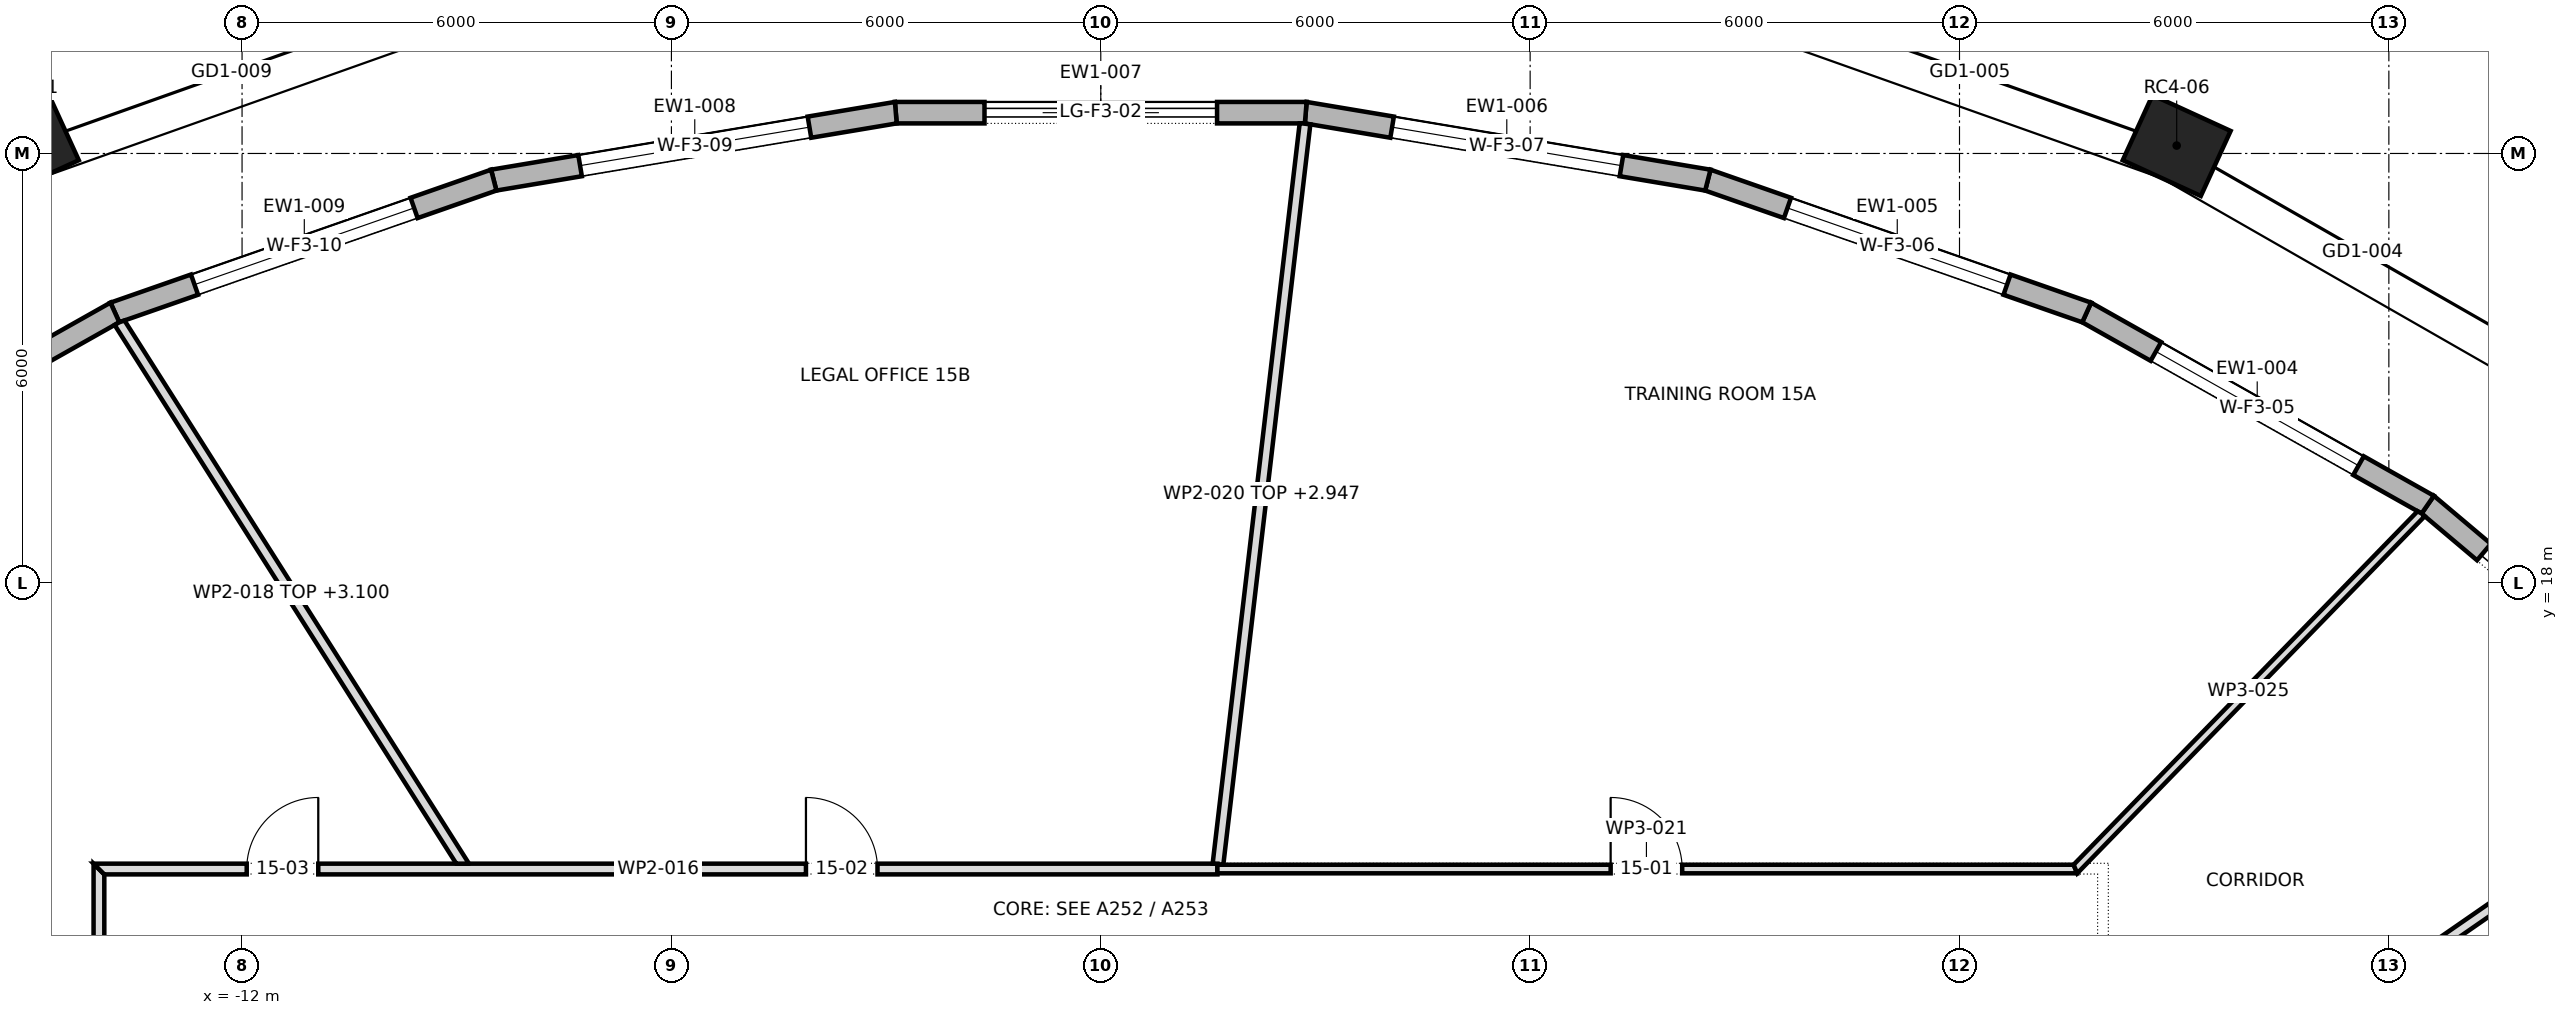
"""IFC4 building model, lengths in metres.
Left out: names, types, materials, properties, quantities, classifications, styles, units other than length and angle.
Written with IfcOpenShell. Run it as: python <this file> out.ifc"""

import sys

from ifc_helpers import new_model, si_unit, direction, frame, frame_2d, origin, origin_2d, place, context, subcontext, project, spatial, polyline, rectangle, outline, extrude, element, fill, save


model = new_model("IFC4")
c1 = context("Model", 3, precision=1e-05, world=origin(), true_north=direction((0.0, 1.0)))
c2 = subcontext(c1, "Body", "Model", "MODEL_VIEW")
j1 = project(units=[si_unit("LENGTHUNIT", "METRE"), si_unit("PLANEANGLEUNIT", "RADIAN")], contexts=[c1])
p1 = place(None, origin())
s1 = spatial("IfcSite", under=j1, at=p1, CompositionType="ELEMENT")
p2 = place(p1, origin())
s2 = spatial("IfcBuilding", under=s1, at=p2, CompositionType="ELEMENT")
p3 = place(p2, frame((0.0, 0.0, 214.9)))
s3 = spatial("IfcBuildingStorey", under=s2, at=p3, CompositionType="ELEMENT", Elevation=214.9)
for number, where, z_axis, x_axis in (
    (1, (15.035, 24.11, 0.0), (0.0, 0.0, 1.0), (-0.909, 0.417, 0.0)),
    (2, (-15.035, 24.11, 0.0), (0.0, 0.0, 1.0), (-0.909, -0.417, 0.0)),
):
    element("IfcColumn", number, at=place(p3, frame(where, z_axis=z_axis, x_axis=x_axis)), inside=s3, PredefinedType="COLUMN", context=c2, shape_type="SweptSolid", body=[
        extrude(rectangle(XDim=1.2, YDim=1.0, at=origin_2d()), origin(), (0.0, 0.0, 1.0), 4.0),
    ])
p4 = place(p3, frame((22.599, 15.672, 0.0), z_axis=(0.0, 0.0, 1.0), x_axis=(-0.764397795062, 0.644744919255, 0.0)))
e3 = element("IfcWall", 3, at=p4, inside=s3, PredefinedType="STANDARD", context=c2, shape_type="SweptSolid", body=[
    extrude(outline(polyline([(-0.015, -0.15), (5.319, -0.15), (5.291, 0.15), (0.015, 0.15), (-0.015, -0.15)])), origin(), (0.0, 0.0, 1.0), 3.7),
])
p5 = place(p4, frame((1.028, 0.0, 0.0)))
e4 = element("IfcOpeningElement", 4, at=p5, cuts=e3, PredefinedType="OPENING", context=c2, shape_type="SweptSolid", body=[
    extrude(rectangle(XDim=3.25, YDim=3.25, at=frame_2d((1.625, 1.625))), frame((0.0, 0.162, 0.0), z_axis=(0.0, -1.0, 0.0), x_axis=(1.0, 0.0, 0.0)), (0.0, 0.0, 1.0), 0.324),
])
p6 = place(p3, frame((18.543, 19.092, 0.0), z_axis=(0.0, 0.0, 1.0), x_axis=(-0.871207038577, 0.490915772749, 0.0)))
e5 = element("IfcWall", 5, at=p6, inside=s3, PredefinedType="STANDARD", context=c2, shape_type="SweptSolid", body=[
    extrude(outline(polyline([(-0.014, -0.15), (5.484, -0.15), (5.458, 0.15), (0.014, 0.15), (-0.014, -0.15)])), origin(), (0.0, 0.0, 1.0), 3.7),
])
p7 = place(p6, frame((1.111, 0.0, 0.6)))
e6 = element("IfcOpeningElement", 6, at=p7, cuts=e5, PredefinedType="OPENING", context=c2, shape_type="SweptSolid", body=[
    extrude(rectangle(XDim=3.25, YDim=2.65, at=frame_2d((1.625, 1.325))), frame((0.0, 0.162, 0.0), z_axis=(0.0, -1.0, 0.0), x_axis=(1.0, 0.0, 0.0)), (0.0, 0.0, 1.0), 0.324),
])
p8 = place(p3, frame((13.777, 21.778, 0.0), z_axis=(0.0, 0.0, 1.0), x_axis=(-0.944053670735, 0.329791853708, 0.0)))
e7 = element("IfcWall", 7, at=p8, inside=s3, PredefinedType="STANDARD", context=c2, shape_type="SweptSolid", body=[
    extrude(outline(polyline([(-0.013, -0.15), (5.62, -0.15), (5.595, 0.15), (0.013, 0.15), (-0.013, -0.15)])), origin(), (0.0, 0.0, 1.0), 3.7),
])
p9 = place(p8, frame((1.179, 0.0, 0.6)))
e8 = element("IfcOpeningElement", 8, at=p9, cuts=e7, PredefinedType="OPENING", context=c2, shape_type="SweptSolid", body=[
    extrude(rectangle(XDim=3.25, YDim=2.65, at=frame_2d((1.625, 1.325))), frame((0.0, 0.162, 0.0), z_axis=(0.0, -1.0, 0.0), x_axis=(1.0, 0.0, 0.0)), (0.0, 0.0, 1.0), 0.324),
])
p10 = place(p3, frame((8.483, 23.627, 0.0), z_axis=(0.0, 0.0, 1.0), x_axis=(-0.986218486863, 0.16544816762, 0.0)))
e9 = element("IfcWall", 9, at=p10, inside=s3, PredefinedType="STANDARD", context=c2, shape_type="SweptSolid", body=[
    extrude(outline(polyline([(-0.013, -0.15), (5.71, -0.15), (5.685, 0.15), (0.013, 0.15), (-0.013, -0.15)])), origin(), (0.0, 0.0, 1.0), 3.7),
])
p11 = place(p10, frame((1.224, 0.0, 0.6)))
e10 = element("IfcOpeningElement", 10, at=p11, cuts=e9, PredefinedType="OPENING", context=c2, shape_type="SweptSolid", body=[
    extrude(rectangle(XDim=3.25, YDim=2.65, at=frame_2d((1.625, 1.325))), frame((0.0, 0.162, 0.0), z_axis=(0.0, -1.0, 0.0), x_axis=(1.0, 0.0, 0.0)), (0.0, 0.0, 1.0), 0.324),
])
p12 = place(p3, frame((2.864, 24.57, 0.0), z_axis=(0.0, 0.0, 1.0), x_axis=(-1.0, 0.0, 0.0)))
e11 = element("IfcWall", 11, at=p12, inside=s3, PredefinedType="STANDARD", context=c2, shape_type="SweptSolid", body=[
    extrude(outline(polyline([(-0.012, -0.15), (5.741, -0.15), (5.716, 0.15), (0.012, 0.15), (-0.012, -0.15)])), origin(), (0.0, 0.0, 1.0), 3.7),
])
p13 = place(p12, frame((1.239, 0.0, 0.0)))
e12 = element("IfcOpeningElement", 12, at=p13, cuts=e11, PredefinedType="OPENING", context=c2, shape_type="SweptSolid", body=[
    extrude(rectangle(XDim=3.25, YDim=3.25, at=frame_2d((1.625, 1.625))), frame((0.0, 0.162, 0.0), z_axis=(0.0, -1.0, 0.0), x_axis=(1.0, 0.0, 0.0)), (0.0, 0.0, 1.0), 0.324),
])
p14 = place(p3, frame((-2.864, 24.57, 0.0), z_axis=(0.0, 0.0, 1.0), x_axis=(-0.986218486863, -0.16544816762, 0.0)))
e13 = element("IfcWall", 13, at=p14, inside=s3, PredefinedType="STANDARD", context=c2, shape_type="SweptSolid", body=[
    extrude(outline(polyline([(-0.012, -0.15), (5.71, -0.15), (5.685, 0.15), (0.012, 0.15), (-0.012, -0.15)])), origin(), (0.0, 0.0, 1.0), 3.7),
])
p15 = place(p14, frame((1.224, 0.0, 0.6)))
e14 = element("IfcOpeningElement", 14, at=p15, cuts=e13, PredefinedType="OPENING", context=c2, shape_type="SweptSolid", body=[
    extrude(rectangle(XDim=3.25, YDim=2.65, at=frame_2d((1.625, 1.325))), frame((0.0, 0.162, 0.0), z_axis=(0.0, -1.0, 0.0), x_axis=(1.0, 0.0, 0.0)), (0.0, 0.0, 1.0), 0.324),
])
p16 = place(p3, frame((-8.483, 23.627, 0.0), z_axis=(0.0, 0.0, 1.0), x_axis=(-0.944053670735, -0.329791853708, 0.0)))
e15 = element("IfcWall", 15, at=p16, inside=s3, PredefinedType="STANDARD", context=c2, shape_type="SweptSolid", body=[
    extrude(outline(polyline([(-0.013, -0.15), (5.621, -0.15), (5.594, 0.15), (0.013, 0.15), (-0.013, -0.15)])), origin(), (0.0, 0.0, 1.0), 3.7),
])
p17 = place(p16, frame((1.179, 0.0, 0.6)))
e16 = element("IfcOpeningElement", 16, at=p17, cuts=e15, PredefinedType="OPENING", context=c2, shape_type="SweptSolid", body=[
    extrude(rectangle(XDim=3.25, YDim=2.65, at=frame_2d((1.625, 1.325))), frame((0.0, 0.162, 0.0), z_axis=(0.0, -1.0, 0.0), x_axis=(1.0, 0.0, 0.0)), (0.0, 0.0, 1.0), 0.324),
])
p18 = place(p3, frame((-13.777, 21.778, 0.0), z_axis=(0.0, 0.0, 1.0), x_axis=(-0.871207038577, -0.490915772749, 0.0)))
e17 = element("IfcWall", 17, at=p18, inside=s3, PredefinedType="STANDARD", context=c2, shape_type="SweptSolid", body=[
    extrude(outline(polyline([(-0.013, -0.15), (5.485, -0.15), (5.457, 0.15), (0.013, 0.15), (-0.013, -0.15)])), origin(), (0.0, 0.0, 1.0), 3.7),
])
p19 = place(p18, frame((1.111, 0.0, 0.6)))
e18 = element("IfcOpeningElement", 18, at=p19, cuts=e17, PredefinedType="OPENING", context=c2, shape_type="SweptSolid", body=[
    extrude(rectangle(XDim=3.25, YDim=2.65, at=frame_2d((1.625, 1.325))), frame((0.0, 0.162, 0.0), z_axis=(0.0, -1.0, 0.0), x_axis=(1.0, 0.0, 0.0)), (0.0, 0.0, 1.0), 0.324),
])
p20 = place(p3, frame((-22.494, 15.57, 0.0), z_axis=(0.0, 0.0, 1.0), x_axis=(0.822227997751, -0.569158255421, 0.0)))
e19 = element("IfcWall", 19, at=p20, inside=s3, PredefinedType="PARTITIONING", context=c2, shape_type="SweptSolid", body=[
    extrude(outline(polyline([(0.0, -0.075), (1.858, -0.075), (3.717, -0.075), (5.575, -0.075), (5.577, -0.073), (5.578, -0.075), (7.155, -0.075), (8.732, -0.075), (10.309, -0.075), (10.309, -0.075), (10.281, -0.034), (10.269, -0.043), (10.24, -0.002), (10.24, -0.002), (10.187, 0.075), (8.493, 0.075), (6.8, 0.075), (5.106, 0.075), (3.412, 0.075), (1.719, 0.075), (0.025, 0.075), (0.004, -0.0), (0.0, -0.066), (0.0, -0.075)])), origin(), (0.0, 0.0, 1.0), 2.947),
])
p21 = place(p3, frame((-14.0, 9.69, 0.0), z_axis=(0.0, 0.0, 1.0), x_axis=(0.0, 1.0, 0.0)))
e20 = element("IfcWall", 20, at=p21, inside=s3, PredefinedType="PARTITIONING", context=c2, shape_type="SweptSolid", body=[
    extrude(outline(polyline([(0.0, -0.075), (1.412, -0.075), (2.823, -0.075), (4.235, -0.075), (4.385, 0.075), (2.923, 0.075), (1.462, 0.075), (0.0, 0.075), (0.0, -0.075)])), origin(), (0.0, 0.0, 1.0), 3.7),
])
p22 = place(p3, frame((-14.075, 14.0, 0.0), z_axis=(0.0, 0.0, 1.0), x_axis=(1.0, 0.0, 0.0)))
e21 = element("IfcWall", 21, at=p22, inside=s3, PredefinedType="PARTITIONING", context=c2, shape_type="SweptSolid", body=[
    extrude(outline(polyline([(15.705, 0.075), (13.742, 0.075), (11.779, 0.075), (9.815, 0.075), (7.853, 0.075), (5.889, 0.075), (3.926, 0.075), (1.963, 0.075), (0.0, 0.075), (0.15, -0.075), (2.094, -0.075), (4.039, -0.075), (5.983, -0.075), (7.927, -0.075), (9.872, -0.075), (11.816, -0.075), (13.76, -0.075), (15.705, -0.075), (15.705, 0.075)])), origin(), (0.0, 0.0, 1.0), 3.7),
])
p23 = place(p22, frame((9.955, 0.0, 0.0)))
e22 = element("IfcOpeningElement", 22, at=p23, cuts=e21, PredefinedType="OPENING", context=c2, shape_type="SweptSolid", body=[
    extrude(rectangle(XDim=1.0, YDim=2.1, at=frame_2d((0.5, 1.05))), frame((0.0, 0.087, 0.0), z_axis=(0.0, -1.0, 0.0), x_axis=(1.0, 0.0, 0.0)), (0.0, 0.0, 1.0), 0.174),
])
p24 = place(p22, frame((2.14, 0.0, 0.0)))
e23 = element("IfcOpeningElement", 23, at=p24, cuts=e21, PredefinedType="OPENING", context=c2, shape_type="SweptSolid", body=[
    extrude(rectangle(XDim=1.0, YDim=2.1, at=frame_2d((0.5, 1.05))), frame((0.0, 0.087, 0.0), z_axis=(0.0, -1.0, 0.0), x_axis=(1.0, 0.0, 0.0)), (0.0, 0.0, 1.0), 0.174),
])
p25 = place(p3, frame((-8.892, 14.035, 0.0), z_axis=(0.0, 0.0, 1.0), x_axis=(-0.535558051622, 0.84449841524, 0.0)))
e24 = element("IfcWall", 24, at=p25, inside=s3, PredefinedType="PARTITIONING", context=c2, shape_type="SweptSolid", body=[
    extrude(outline(polyline([(0.0, -0.075), (1.798, -0.075), (3.595, -0.075), (5.393, -0.075), (7.191, -0.075), (8.989, -0.075), (9.006, -0.0), (9.01, 0.069), (9.01, 0.075), (7.227, 0.075), (5.444, 0.075), (3.661, 0.075), (1.878, 0.075), (0.095, 0.075), (0.0, -0.075), (0.0, -0.075)])), origin(), (0.0, 0.0, 1.0), 3.1),
])
p26 = place(p3, frame((1.638, 14.066, 0.0), z_axis=(0.0, 0.0, 1.0), x_axis=(0.116747450487, 0.993161634783, 0.0)))
e25 = element("IfcWall", 25, at=p26, inside=s3, PredefinedType="PARTITIONING", context=c2, shape_type="SweptSolid", body=[
    extrude(outline(polyline([(10.42, -0.075), (10.42, 0.039), (10.416, 0.075), (8.68, 0.075), (6.944, 0.075), (5.208, 0.075), (3.472, 0.075), (1.736, 0.075), (0.0, 0.075), (0.0, 0.074), (0.008, 0.009), (0.0, 0.008), (0.0, -0.055), (0.002, -0.075), (1.739, -0.075), (3.475, -0.075), (5.211, -0.075), (6.948, -0.075), (8.684, -0.075), (10.42, -0.075)])), origin(), (0.0, 0.0, 1.0), 2.947),
])
p27 = place(p3, frame((1.63, 14.0, 0.0), z_axis=(0.0, 0.0, 1.0), x_axis=(1.0, 0.0, 0.0)))
e26 = element("IfcWall", 26, at=p27, inside=s3, PredefinedType="PARTITIONING", context=c2, shape_type="SweptSolid", body=[
    extrude(outline(polyline([(12.015, -0.06), (12.015, -0.06), (11.965, 0.06), (9.971, 0.06), (7.977, 0.06), (5.982, 0.06), (3.988, 0.06), (1.994, 0.06), (0.0, 0.06), (0.0, -0.06), (1.717, -0.06), (3.433, -0.06), (5.149, -0.06), (6.866, -0.06), (8.583, -0.06), (10.299, -0.06), (12.015, -0.06)])), origin(), (0.0, 0.0, 1.0), 3.7),
])
p28 = place(p27, frame((5.495, 0.0, 0.0)))
e27 = element("IfcOpeningElement", 27, at=p28, cuts=e26, PredefinedType="OPENING", context=c2, shape_type="SweptSolid", body=[
    extrude(rectangle(XDim=1.0, YDim=2.1, at=frame_2d((0.5, 1.05))), frame((0.0, 0.072, 0.0), z_axis=(0.0, -1.0, 0.0), x_axis=(1.0, 0.0, 0.0)), (0.0, 0.0, 1.0), 0.144),
])
p29 = place(p3, frame((13.602, 13.982, 0.0), z_axis=(0.0, 0.0, 1.0), x_axis=(0.697346685185, 0.716733981797, 0.0)))
e28 = element("IfcWall", 28, at=p29, inside=s3, PredefinedType="PARTITIONING", context=c2, shape_type="SweptSolid", body=[
    extrude(outline(polyline([(6.964, -0.06), (6.964, -0.058), (6.96, -0.002), (6.943, 0.06), (5.22, 0.06), (3.497, 0.06), (1.774, 0.06), (0.051, 0.06), (0.051, 0.06), (0.025, 0.0), (0.0, -0.06), (1.741, -0.06), (3.482, -0.06), (5.223, -0.06), (6.964, -0.06)])), origin(), (0.0, 0.0, 1.0), 3.7),
])
p30 = place(p3, frame((13.968, 9.667, 0.0), z_axis=(0.0, 0.0, 1.0), x_axis=(0.822219313141, 0.56917080134, 0.0)))
e29 = element("IfcWall", 29, at=p30, inside=s3, PredefinedType="PARTITIONING", context=c2, shape_type="SweptSolid", body=[
    extrude(outline(polyline([(0.079, -0.075), (1.65, -0.075), (3.22, -0.075), (4.791, -0.075), (4.792, -0.073), (4.795, -0.075), (6.653, -0.075), (8.511, -0.075), (10.37, -0.075), (10.37, -0.066), (10.365, -0.0), (10.345, 0.075), (8.621, 0.075), (6.897, 0.075), (5.173, 0.075), (3.448, 0.075), (1.724, 0.075), (0.0, 0.075), (0.039, 0.0), (0.079, -0.075)])), origin(), (0.0, 0.0, 1.0), 2.947),
])
p31 = place(p5, origin())
e30 = element("IfcDoor", 30, at=p31, inside=s3, OperationType="DOUBLE_DOOR_SLIDING", PredefinedType="DOOR", context=c2, shape_type="SweptSolid", body=[
    extrude(rectangle(XDim=3.25, YDim=3.25, at=frame_2d((1.625, 1.625))), frame((0.0, 0.025, 0.0), z_axis=(0.0, -1.0, 0.0), x_axis=(1.0, 0.0, 0.0)), (0.0, 0.0, 1.0), 0.05),
])
fill(e4, e30)
p32 = place(p7, origin())
e31 = element("IfcWindow", 31, at=p32, inside=s3, PartitioningType="TRIPLE_PANEL_VERTICAL", PredefinedType="WINDOW", context=c2, shape_type="SweptSolid", body=[
    extrude(rectangle(XDim=3.25, YDim=2.65, at=frame_2d((1.625, 1.325))), frame((0.0, 0.03, 0.0), z_axis=(0.0, -1.0, 0.0), x_axis=(1.0, 0.0, 0.0)), (0.0, 0.0, 1.0), 0.06),
])
fill(e6, e31)
p33 = place(p9, origin())
e32 = element("IfcWindow", 32, at=p33, inside=s3, PartitioningType="TRIPLE_PANEL_VERTICAL", PredefinedType="WINDOW", context=c2, shape_type="SweptSolid", body=[
    extrude(rectangle(XDim=3.25, YDim=2.65, at=frame_2d((1.625, 1.325))), frame((0.0, 0.03, 0.0), z_axis=(0.0, -1.0, 0.0), x_axis=(1.0, 0.0, 0.0)), (0.0, 0.0, 1.0), 0.06),
])
fill(e8, e32)
p34 = place(p11, origin())
e33 = element("IfcWindow", 33, at=p34, inside=s3, PartitioningType="TRIPLE_PANEL_VERTICAL", PredefinedType="WINDOW", context=c2, shape_type="SweptSolid", body=[
    extrude(rectangle(XDim=3.25, YDim=2.65, at=frame_2d((1.625, 1.325))), frame((0.0, 0.03, 0.0), z_axis=(0.0, -1.0, 0.0), x_axis=(1.0, 0.0, 0.0)), (0.0, 0.0, 1.0), 0.06),
])
fill(e10, e33)
p35 = place(p13, origin())
e34 = element("IfcDoor", 34, at=p35, inside=s3, OperationType="DOUBLE_DOOR_SLIDING", PredefinedType="DOOR", context=c2, shape_type="SweptSolid", body=[
    extrude(rectangle(XDim=3.25, YDim=3.25, at=frame_2d((1.625, 1.625))), frame((0.0, 0.025, 0.0), z_axis=(0.0, -1.0, 0.0), x_axis=(1.0, 0.0, 0.0)), (0.0, 0.0, 1.0), 0.05),
])
fill(e12, e34)
p36 = place(p15, origin())
e35 = element("IfcWindow", 35, at=p36, inside=s3, PartitioningType="TRIPLE_PANEL_VERTICAL", PredefinedType="WINDOW", context=c2, shape_type="SweptSolid", body=[
    extrude(rectangle(XDim=3.25, YDim=2.65, at=frame_2d((1.625, 1.325))), frame((0.0, 0.03, 0.0), z_axis=(0.0, -1.0, 0.0), x_axis=(1.0, 0.0, 0.0)), (0.0, 0.0, 1.0), 0.06),
])
fill(e14, e35)
p37 = place(p17, origin())
e36 = element("IfcWindow", 36, at=p37, inside=s3, PartitioningType="TRIPLE_PANEL_VERTICAL", PredefinedType="WINDOW", context=c2, shape_type="SweptSolid", body=[
    extrude(rectangle(XDim=3.25, YDim=2.65, at=frame_2d((1.625, 1.325))), frame((0.0, 0.03, 0.0), z_axis=(0.0, -1.0, 0.0), x_axis=(1.0, 0.0, 0.0)), (0.0, 0.0, 1.0), 0.06),
])
fill(e16, e36)
p38 = place(p28, origin())
e37 = element("IfcDoor", 37, at=p38, inside=s3, OperationType="SINGLE_SWING_RIGHT", PredefinedType="DOOR", context=c2, shape_type="SweptSolid", body=[
    extrude(rectangle(XDim=1.0, YDim=2.1, at=frame_2d((0.5, 1.05))), frame((0.0, 0.025, 0.0), z_axis=(0.0, -1.0, 0.0), x_axis=(1.0, 0.0, 0.0)), (0.0, 0.0, 1.0), 0.05),
])
fill(e27, e37)
p39 = place(p23, origin())
e38 = element("IfcDoor", 38, at=p39, inside=s3, OperationType="SINGLE_SWING_RIGHT", PredefinedType="DOOR", context=c2, shape_type="SweptSolid", body=[
    extrude(rectangle(XDim=1.0, YDim=2.1, at=frame_2d((0.5, 1.05))), frame((0.0, 0.025, 0.0), z_axis=(0.0, -1.0, 0.0), x_axis=(1.0, 0.0, 0.0)), (0.0, 0.0, 1.0), 0.05),
])
fill(e22, e38)
p40 = place(p24, origin())
e39 = element("IfcDoor", 39, at=p40, inside=s3, OperationType="SINGLE_SWING_LEFT", PredefinedType="DOOR", context=c2, shape_type="SweptSolid", body=[
    extrude(rectangle(XDim=1.0, YDim=2.1, at=frame_2d((0.5, 1.05))), frame((0.0, 0.025, 0.0), z_axis=(0.0, -1.0, 0.0), x_axis=(1.0, 0.0, 0.0)), (0.0, 0.0, 1.0), 0.05),
])
fill(e23, e39)
save(model, sys.argv[1])
